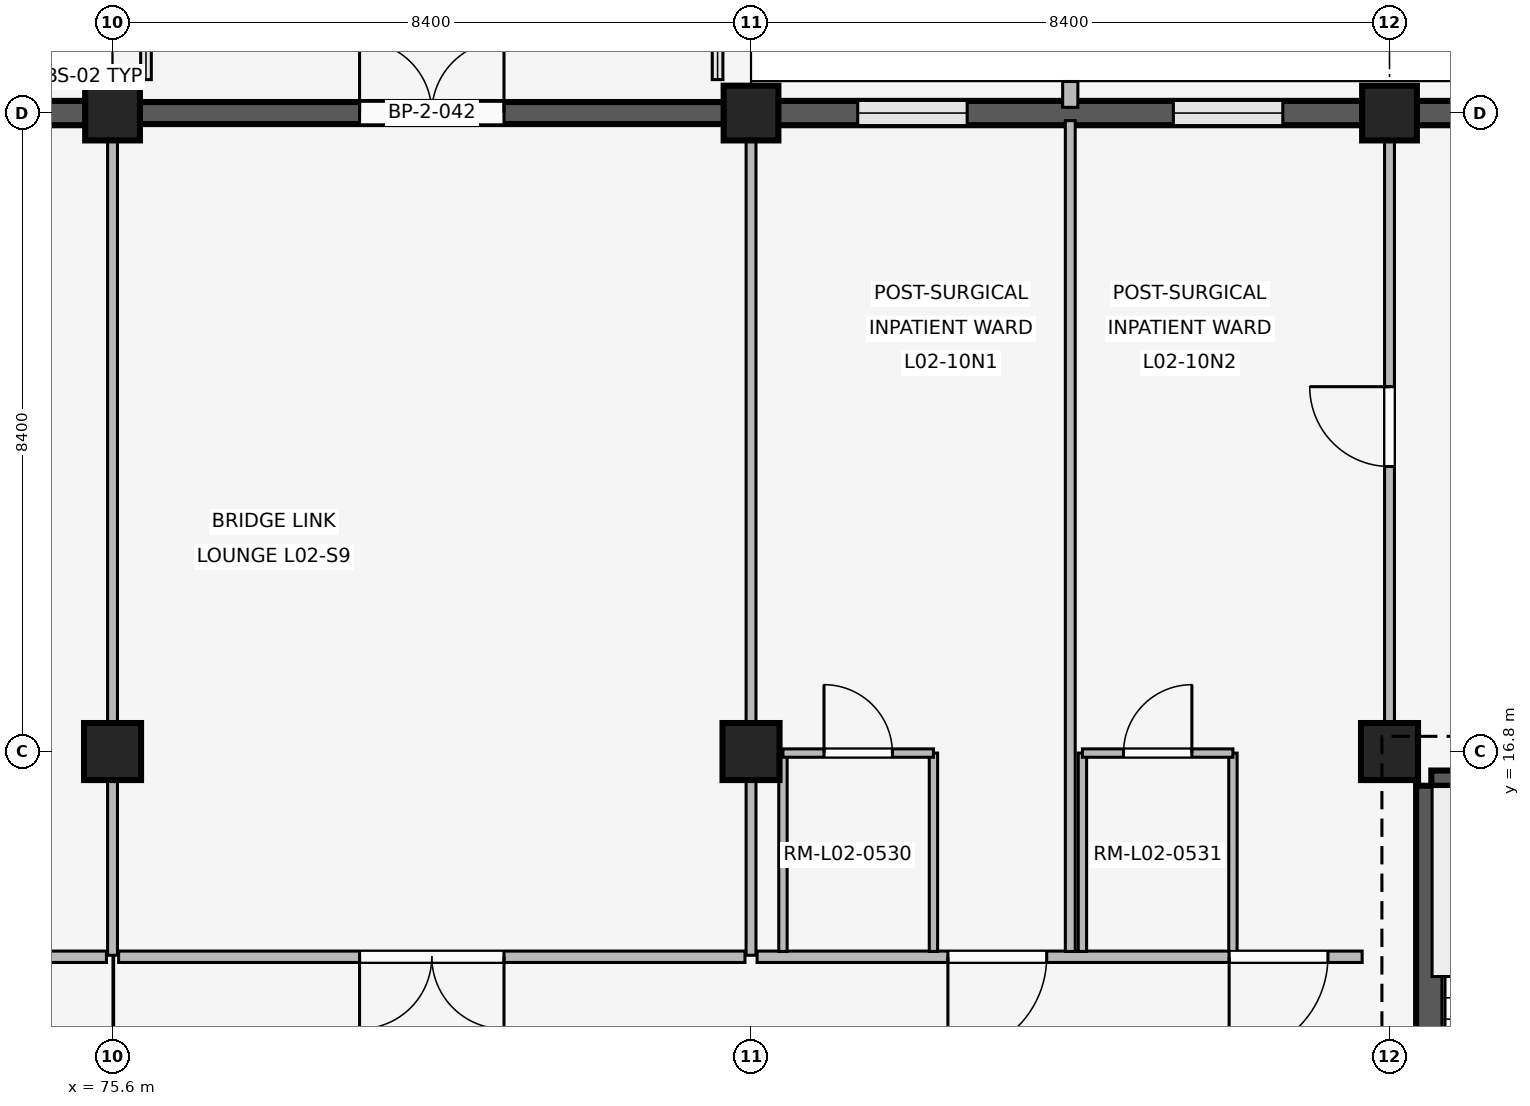
"""IFC4 building model, lengths in metres.
Left out: names, types, materials, properties, quantities, classifications, styles, units other than length and angle.
Written with IfcOpenShell. Run it as: python <this file> out.ifc"""

import sys

from ifc_helpers import new_model, si_unit, direction, frame, frame_2d, origin, origin_2d, place, context, subcontext, project, spatial, rectangle, extrude, element, fill, save


model = new_model("IFC4")
c1 = context("Model", 3, precision=1e-05, world=origin(), true_north=direction((0.0, 1.0)))
c2 = subcontext(c1, "Body", "Model", "MODEL_VIEW")
j1 = project(units=[si_unit("LENGTHUNIT", "METRE"), si_unit("PLANEANGLEUNIT", "RADIAN")], contexts=[c1])
p1 = place(None, origin())
s1 = spatial("IfcSite", under=j1, at=p1, CompositionType="ELEMENT")
p2 = place(p1, origin())
s2 = spatial("IfcBuilding", under=s1, at=p2, CompositionType="ELEMENT")
p3 = place(p2, frame((0.0, 0.0, 8.1)))
s3 = spatial("IfcBuildingStorey", under=s2, at=p3, CompositionType="ELEMENT", Elevation=8.1)
p4 = place(p3, frame((75.6, 16.8, 0.0), z_axis=(0.0, 0.0, 1.0), x_axis=(1.0, 0.0, 0.0)))
e1 = element("IfcColumn", 1, at=p4, inside=s3, PredefinedType="COLUMN", context=c2, shape_type="SweptSolid", body=[
    extrude(rectangle(XDim=0.75, YDim=0.75, at=origin_2d()), origin(), (0.0, 0.0, 1.0), 4.8),
])
p5 = place(p3, frame((75.6, 25.2, 0.0), z_axis=(0.0, 0.0, 1.0), x_axis=(1.0, 0.0, 0.0)))
e2 = element("IfcColumn", 2, at=p5, inside=s3, PredefinedType="COLUMN", context=c2, shape_type="SweptSolid", body=[
    extrude(rectangle(XDim=0.72, YDim=0.72, at=origin_2d()), origin(), (0.0, 0.0, 1.0), 4.8),
])
p6 = place(p3, frame((84.0, 16.8, 0.0), z_axis=(0.0, 0.0, 1.0), x_axis=(1.0, 0.0, 0.0)))
e3 = element("IfcColumn", 3, at=p6, inside=s3, PredefinedType="COLUMN", context=c2, shape_type="SweptSolid", body=[
    extrude(rectangle(XDim=0.75, YDim=0.75, at=origin_2d()), origin(), (0.0, 0.0, 1.0), 4.8),
])
p7 = place(p3, frame((84.0, 25.2, 0.0), z_axis=(0.0, 0.0, 1.0), x_axis=(1.0, 0.0, 0.0)))
e4 = element("IfcColumn", 4, at=p7, inside=s3, PredefinedType="COLUMN", context=c2, shape_type="SweptSolid", body=[
    extrude(rectangle(XDim=0.72, YDim=0.72, at=origin_2d()), origin(), (0.0, 0.0, 1.0), 4.8),
])
p8 = place(p3, frame((92.4, 16.8, 0.0), z_axis=(0.0, 0.0, 1.0), x_axis=(1.0, 0.0, 0.0)))
e5 = element("IfcColumn", 5, at=p8, inside=s3, PredefinedType="COLUMN", context=c2, shape_type="SweptSolid", body=[
    extrude(rectangle(XDim=0.75, YDim=0.75, at=origin_2d()), origin(), (0.0, 0.0, 1.0), 4.8),
])
p9 = place(p3, frame((92.4, 25.2, 0.0), z_axis=(0.0, 0.0, 1.0), x_axis=(1.0, 0.0, 0.0)))
e6 = element("IfcColumn", 6, at=p9, inside=s3, PredefinedType="COLUMN", context=c2, shape_type="SweptSolid", body=[
    extrude(rectangle(XDim=0.72, YDim=0.72, at=origin_2d()), origin(), (0.0, 0.0, 1.0), 4.8),
])
p10 = place(p3, frame((67.555, 25.2, 0.0), z_axis=(0.0, 0.0, 1.0), x_axis=(1.0, 0.0, 0.0)))
e7 = element("IfcWall", 7, at=p10, inside=s3, PredefinedType="SOLIDWALL", context=c2, shape_type="SweptSolid", body=[
    extrude(rectangle(XDim=7.69, YDim=0.32, at=frame_2d((3.845, 0.0))), origin(), (0.0, 0.0, 1.0), 3.86),
])
p11 = place(p10, frame((0.989, 0.0, 0.85)))
e8 = element("IfcOpeningElement", 8, at=p11, cuts=e7, PredefinedType="OPENING", context=c2, shape_type="SweptSolid", body=[
    extrude(rectangle(XDim=1.56, YDim=1.7, at=frame_2d((0.78, 0.85))), frame((0.0, 0.17, 0.0), z_axis=(0.0, -1.0, 0.0), x_axis=(1.0, 0.0, 0.0)), (0.0, 0.0, 1.0), 0.34),
])
p12 = place(p10, frame((5.141, 0.0, 0.85)))
e9 = element("IfcOpeningElement", 9, at=p12, cuts=e7, PredefinedType="OPENING", context=c2, shape_type="SweptSolid", body=[
    extrude(rectangle(XDim=1.56, YDim=1.7, at=frame_2d((0.78, 0.85))), frame((0.0, 0.17, 0.0), z_axis=(0.0, -1.0, 0.0), x_axis=(1.0, 0.0, 0.0)), (0.0, 0.0, 1.0), 0.34),
])
p13 = place(p3, frame((75.955, 25.2, 0.0), z_axis=(0.0, 0.0, 1.0), x_axis=(1.0, 0.0, 0.0)))
e10 = element("IfcWall", 10, at=p13, inside=s3, PredefinedType="SOLIDWALL", context=c2, shape_type="SweptSolid", body=[
    extrude(rectangle(XDim=7.69, YDim=0.29, at=frame_2d((3.845, 0.0))), origin(), (0.0, 0.0, 1.0), 3.86),
])
p14 = place(p13, frame((2.895, 0.0, 0.0)))
e11 = element("IfcOpeningElement", 11, at=p14, cuts=e10, PredefinedType="OPENING", context=c2, shape_type="SweptSolid", body=[
    extrude(rectangle(XDim=1.9, YDim=2.4, at=frame_2d((0.95, 1.2))), frame((0.0, 0.155, 0.0), z_axis=(0.0, -1.0, 0.0), x_axis=(1.0, 0.0, 0.0)), (0.0, 0.0, 1.0), 0.31),
])
p15 = place(p3, frame((84.355, 25.2, 0.0), z_axis=(0.0, 0.0, 1.0), x_axis=(1.0, 0.0, 0.0)))
e12 = element("IfcWall", 12, at=p15, inside=s3, PredefinedType="SOLIDWALL", context=c2, shape_type="SweptSolid", body=[
    extrude(rectangle(XDim=7.69, YDim=0.32, at=frame_2d((3.845, 0.0))), origin(), (0.0, 0.0, 1.0), 3.86),
])
p16 = place(p15, frame((1.049, 0.0, 0.85)))
e13 = element("IfcOpeningElement", 13, at=p16, cuts=e12, PredefinedType="OPENING", context=c2, shape_type="SweptSolid", body=[
    extrude(rectangle(XDim=1.44, YDim=1.62, at=frame_2d((0.72, 0.81))), frame((0.0, 0.17, 0.0), z_axis=(0.0, -1.0, 0.0), x_axis=(1.0, 0.0, 0.0)), (0.0, 0.0, 1.0), 0.34),
])
p17 = place(p15, frame((5.201, 0.0, 0.85)))
e14 = element("IfcOpeningElement", 14, at=p17, cuts=e12, PredefinedType="OPENING", context=c2, shape_type="SweptSolid", body=[
    extrude(rectangle(XDim=1.44, YDim=1.62, at=frame_2d((0.72, 0.81))), frame((0.0, 0.17, 0.0), z_axis=(0.0, -1.0, 0.0), x_axis=(1.0, 0.0, 0.0)), (0.0, 0.0, 1.0), 0.34),
])
p18 = place(p3, frame((88.2, 25.275, 0.0), z_axis=(0.0, 0.0, 1.0), x_axis=(0.0, 1.0, 0.0)))
e15 = element("IfcWall", 15, at=p18, inside=s3, PredefinedType="ELEMENTEDWALL", context=c2, shape_type="SweptSolid", body=[
    extrude(rectangle(XDim=0.34, YDim=0.2, at=frame_2d((0.17, 0.0))), origin(), (0.0, 0.0, 1.0), 3.84),
])
p19 = place(p3, frame((92.755, 25.2, 0.0), z_axis=(0.0, 0.0, 1.0), x_axis=(1.0, 0.0, 0.0)))
e16 = element("IfcWall", 16, at=p19, inside=s3, PredefinedType="SOLIDWALL", context=c2, shape_type="SweptSolid", body=[
    extrude(rectangle(XDim=7.69, YDim=0.32, at=frame_2d((3.845, 0.0))), origin(), (0.0, 0.0, 1.0), 3.86),
])
p20 = place(p19, frame((1.109, 0.0, 0.85)))
e17 = element("IfcOpeningElement", 17, at=p20, cuts=e16, PredefinedType="OPENING", context=c2, shape_type="SweptSolid", body=[
    extrude(rectangle(XDim=1.32, YDim=1.58, at=frame_2d((0.66, 0.79))), frame((0.0, 0.17, 0.0), z_axis=(0.0, -1.0, 0.0), x_axis=(1.0, 0.0, 0.0)), (0.0, 0.0, 1.0), 0.34),
])
p21 = place(p19, frame((5.261, 0.0, 0.85)))
e18 = element("IfcOpeningElement", 18, at=p21, cuts=e16, PredefinedType="OPENING", context=c2, shape_type="SweptSolid", body=[
    extrude(rectangle(XDim=1.32, YDim=1.58, at=frame_2d((0.66, 0.79))), frame((0.0, 0.17, 0.0), z_axis=(0.0, -1.0, 0.0), x_axis=(1.0, 0.0, 0.0)), (0.0, 0.0, 1.0), 0.34),
])
p22 = place(p3, frame((92.95, 16.35, 0.0), z_axis=(0.0, 0.0, 1.0), x_axis=(1.0, 0.0, 0.0)))
e19 = element("IfcWall", 19, at=p22, inside=s3, PredefinedType="SHEAR", context=c2, shape_type="SweptSolid", body=[
    extrude(rectangle(XDim=7.5, YDim=0.4, at=frame_2d((3.75, 0.0))), origin(), (0.0, 0.0, 1.0), 4.52),
])
p23 = place(p3, frame((92.95, 8.8, 0.0), z_axis=(0.0, 0.0, 1.0), x_axis=(0.0, 1.0, 0.0)))
e20 = element("IfcWall", 20, at=p23, inside=s3, PredefinedType="SHEAR", context=c2, shape_type="SweptSolid", body=[
    extrude(rectangle(XDim=7.55, YDim=0.4, at=frame_2d((3.775, 0.0))), origin(), (0.0, 0.0, 1.0), 4.52),
])
p24 = place(p23, frame((0.28, 0.0, 0.0)))
e21 = element("IfcOpeningElement", 21, at=p24, cuts=e20, PredefinedType="OPENING", context=c2, shape_type="SweptSolid", body=[
    extrude(rectangle(XDim=1.0, YDim=2.15, at=frame_2d((0.5, 1.075))), frame((0.0, 0.21, 0.0), z_axis=(0.0, -1.0, 0.0), x_axis=(1.0, 0.0, 0.0)), (0.0, 0.0, 1.0), 0.42),
])
p25 = place(p3, frame((75.52, 14.1, 0.0), z_axis=(0.0, 0.0, 1.0), x_axis=(-1.0, 0.0, 0.0)))
e22 = element("IfcWall", 22, at=p25, inside=s3, PredefinedType="PARTITIONING", context=c2, shape_type="SweptSolid", body=[
    extrude(rectangle(XDim=8.24, YDim=0.15, at=frame_2d((4.12, 0.0))), origin(), (0.0, 0.0, 1.0), 3.84),
])
p26 = place(p25, frame((3.37, 0.0, 0.0)))
e23 = element("IfcOpeningElement", 23, at=p26, cuts=e22, PredefinedType="OPENING", context=c2, shape_type="SweptSolid", body=[
    extrude(rectangle(XDim=1.5, YDim=2.3, at=frame_2d((0.75, 1.15))), frame((0.0, 0.085, 0.0), z_axis=(0.0, -1.0, 0.0), x_axis=(1.0, 0.0, 0.0)), (0.0, 0.0, 1.0), 0.17),
])
p27 = place(p3, frame((75.6, 14.12, 0.0), z_axis=(0.0, 0.0, 1.0), x_axis=(0.0, 1.0, 0.0)))
e24 = element("IfcWall", 24, at=p27, inside=s3, PredefinedType="PARTITIONING", context=c2, shape_type="SweptSolid", body=[
    extrude(rectangle(XDim=10.94, YDim=0.13, at=frame_2d((5.47, 0.0))), origin(), (0.0, 0.0, 1.0), 3.84),
])
p28 = place(p3, frame((83.92, 14.1, 0.0), z_axis=(0.0, 0.0, 1.0), x_axis=(-1.0, 0.0, 0.0)))
e25 = element("IfcWall", 25, at=p28, inside=s3, PredefinedType="PARTITIONING", context=c2, shape_type="SweptSolid", body=[
    extrude(rectangle(XDim=8.24, YDim=0.15, at=frame_2d((4.12, 0.0))), origin(), (0.0, 0.0, 1.0), 3.84),
])
p29 = place(p28, frame((3.17, 0.0, 0.0)))
e26 = element("IfcOpeningElement", 26, at=p29, cuts=e25, PredefinedType="OPENING", context=c2, shape_type="SweptSolid", body=[
    extrude(rectangle(XDim=1.9, YDim=2.4, at=frame_2d((0.95, 1.2))), frame((0.0, 0.085, 0.0), z_axis=(0.0, -1.0, 0.0), x_axis=(1.0, 0.0, 0.0)), (0.0, 0.0, 1.0), 0.17),
])
p30 = place(p3, frame((84.0, 14.12, 0.0), z_axis=(0.0, 0.0, 1.0), x_axis=(0.0, 1.0, 0.0)))
e27 = element("IfcWall", 27, at=p30, inside=s3, PredefinedType="PARTITIONING", context=c2, shape_type="SweptSolid", body=[
    extrude(rectangle(XDim=10.94, YDim=0.13, at=frame_2d((5.47, 0.0))), origin(), (0.0, 0.0, 1.0), 3.84),
])
p31 = place(p3, frame((92.04, 14.1, 0.0), z_axis=(0.0, 0.0, 1.0), x_axis=(-1.0, 0.0, 0.0)))
e28 = element("IfcWall", 28, at=p31, inside=s3, PredefinedType="PARTITIONING", context=c2, shape_type="SweptSolid", body=[
    extrude(rectangle(XDim=7.96, YDim=0.15, at=frame_2d((3.98, 0.0))), origin(), (0.0, 0.0, 1.0), 3.84),
])
p32 = place(p31, frame((0.45, 0.0, 0.0)))
e29 = element("IfcOpeningElement", 29, at=p32, cuts=e28, PredefinedType="OPENING", context=c2, shape_type="SweptSolid", body=[
    extrude(rectangle(XDim=1.3, YDim=2.25, at=frame_2d((0.65, 1.125))), frame((0.0, 0.085, 0.0), z_axis=(0.0, -1.0, 0.0), x_axis=(1.0, 0.0, 0.0)), (0.0, 0.0, 1.0), 0.17),
])
p33 = place(p31, frame((4.15, 0.0, 0.0)))
e30 = element("IfcOpeningElement", 30, at=p33, cuts=e28, PredefinedType="OPENING", context=c2, shape_type="SweptSolid", body=[
    extrude(rectangle(XDim=1.3, YDim=2.25, at=frame_2d((0.65, 1.125))), frame((0.0, 0.085, 0.0), z_axis=(0.0, -1.0, 0.0), x_axis=(1.0, 0.0, 0.0)), (0.0, 0.0, 1.0), 0.17),
])
p34 = place(p3, frame((88.2, 14.17, 0.0), z_axis=(0.0, 0.0, 1.0), x_axis=(0.0, 1.0, 0.0)))
e31 = element("IfcWall", 31, at=p34, inside=s3, PredefinedType="PARTITIONING", context=c2, shape_type="SweptSolid", body=[
    extrude(rectangle(XDim=10.93, YDim=0.13, at=frame_2d((5.465, 0.0))), origin(), (0.0, 0.0, 1.0), 3.84),
])
for number, where, z_axis, x_axis in (
    (32, (84.42, 14.17, 0.0), (0.0, 0.0, 1.0), (0.0, 1.0, 0.0)),
    (33, (86.4, 14.17, 0.0), (0.0, 0.0, 1.0), (0.0, 1.0, 0.0)),
):
    element("IfcWall", number, at=place(p3, frame(where, z_axis=z_axis, x_axis=x_axis)), inside=s3, PredefinedType="PARTITIONING", context=c2, shape_type="SweptSolid", body=[
        extrude(rectangle(XDim=2.61, YDim=0.11, at=frame_2d((1.305, 0.0))), origin(), (0.0, 0.0, 1.0), 3.84),
    ])
p35 = place(p3, frame((84.42, 16.78, 0.0), z_axis=(0.0, 0.0, 1.0), x_axis=(1.0, 0.0, 0.0)))
e34 = element("IfcWall", 34, at=p35, inside=s3, PredefinedType="PARTITIONING", context=c2, shape_type="SweptSolid", body=[
    extrude(rectangle(XDim=1.98, YDim=0.11, at=frame_2d((0.99, 0.0))), origin(), (0.0, 0.0, 1.0), 3.84),
])
p36 = place(p35, frame((0.54, 0.0, 0.0)))
e35 = element("IfcOpeningElement", 35, at=p36, cuts=e34, PredefinedType="OPENING", context=c2, shape_type="SweptSolid", body=[
    extrude(rectangle(XDim=0.9, YDim=2.1, at=frame_2d((0.45, 1.05))), frame((0.0, 0.065, 0.0), z_axis=(0.0, -1.0, 0.0), x_axis=(1.0, 0.0, 0.0)), (0.0, 0.0, 1.0), 0.13),
])
for number, where, z_axis, x_axis in (
    (36, (88.36, 14.17, 0.0), (0.0, 0.0, 1.0), (0.0, 1.0, 0.0)),
    (37, (90.34, 14.17, 0.0), (0.0, 0.0, 1.0), (0.0, 1.0, 0.0)),
):
    element("IfcWall", number, at=place(p3, frame(where, z_axis=z_axis, x_axis=x_axis)), inside=s3, PredefinedType="PARTITIONING", context=c2, shape_type="SweptSolid", body=[
        extrude(rectangle(XDim=2.61, YDim=0.11, at=frame_2d((1.305, 0.0))), origin(), (0.0, 0.0, 1.0), 3.84),
    ])
p37 = place(p3, frame((88.36, 16.78, 0.0), z_axis=(0.0, 0.0, 1.0), x_axis=(1.0, 0.0, 0.0)))
e38 = element("IfcWall", 38, at=p37, inside=s3, PredefinedType="PARTITIONING", context=c2, shape_type="SweptSolid", body=[
    extrude(rectangle(XDim=1.98, YDim=0.11, at=frame_2d((0.99, 0.0))), origin(), (0.0, 0.0, 1.0), 3.84),
])
p38 = place(p37, frame((0.54, 0.0, 0.0)))
e39 = element("IfcOpeningElement", 39, at=p38, cuts=e38, PredefinedType="OPENING", context=c2, shape_type="SweptSolid", body=[
    extrude(rectangle(XDim=0.9, YDim=2.1, at=frame_2d((0.45, 1.05))), frame((0.0, 0.065, 0.0), z_axis=(0.0, -1.0, 0.0), x_axis=(1.0, 0.0, 0.0)), (0.0, 0.0, 1.0), 0.13),
])
p39 = place(p3, frame((92.4, 17.15, 0.0), z_axis=(0.0, 0.0, 1.0), x_axis=(0.0, 1.0, 0.0)))
e40 = element("IfcWall", 40, at=p39, inside=s3, PredefinedType="PARTITIONING", context=c2, shape_type="SweptSolid", body=[
    extrude(rectangle(XDim=7.91, YDim=0.13, at=frame_2d((3.955, 0.0))), origin(), (0.0, 0.0, 1.0), 3.84),
])
p40 = place(p39, frame((3.4, 0.0, 0.0)))
e41 = element("IfcOpeningElement", 41, at=p40, cuts=e40, PredefinedType="OPENING", context=c2, shape_type="SweptSolid", body=[
    extrude(rectangle(XDim=1.05, YDim=2.2, at=frame_2d((0.525, 1.1))), frame((0.0, 0.075, 0.0), z_axis=(0.0, -1.0, 0.0), x_axis=(1.0, 0.0, 0.0)), (0.0, 0.0, 1.0), 0.15),
])
p41 = place(p14, origin())
e42 = element("IfcDoor", 42, at=p41, inside=s3, OperationType="DOUBLE_SWING_LEFT", PredefinedType="DOOR", context=c2, shape_type="SweptSolid", body=[
    extrude(rectangle(XDim=1.9, YDim=2.4, at=frame_2d((0.95, 1.2))), frame((0.0, 0.025, 0.0), z_axis=(0.0, -1.0, 0.0), x_axis=(1.0, 0.0, 0.0)), (0.0, 0.0, 1.0), 0.05),
])
fill(e11, e42)
p42 = place(p16, origin())
e43 = element("IfcWindow", 43, at=p42, inside=s3, PartitioningType="SINGLE_PANEL", PredefinedType="WINDOW", context=c2, shape_type="SweptSolid", body=[
    extrude(rectangle(XDim=1.44, YDim=1.62, at=frame_2d((0.72, 0.81))), frame((0.0, 0.03, 0.0), z_axis=(0.0, -1.0, 0.0), x_axis=(1.0, 0.0, 0.0)), (0.0, 0.0, 1.0), 0.06),
])
fill(e13, e43)
p43 = place(p17, origin())
e44 = element("IfcWindow", 44, at=p43, inside=s3, PartitioningType="SINGLE_PANEL", PredefinedType="WINDOW", context=c2, shape_type="SweptSolid", body=[
    extrude(rectangle(XDim=1.44, YDim=1.62, at=frame_2d((0.72, 0.81))), frame((0.0, 0.03, 0.0), z_axis=(0.0, -1.0, 0.0), x_axis=(1.0, 0.0, 0.0)), (0.0, 0.0, 1.0), 0.06),
])
fill(e14, e44)
p44 = place(p29, origin())
e45 = element("IfcDoor", 45, at=p44, inside=s3, OperationType="DOUBLE_SWING_LEFT", PredefinedType="DOOR", context=c2, shape_type="SweptSolid", body=[
    extrude(rectangle(XDim=1.9, YDim=2.4, at=frame_2d((0.95, 1.2))), frame((0.0, 0.025, 0.0), z_axis=(0.0, -1.0, 0.0), x_axis=(1.0, 0.0, 0.0)), (0.0, 0.0, 1.0), 0.05),
])
fill(e26, e45)
p45 = place(p32, origin())
e46 = element("IfcDoor", 46, at=p45, inside=s3, OperationType="SINGLE_SWING_RIGHT", PredefinedType="DOOR", context=c2, shape_type="SweptSolid", body=[
    extrude(rectangle(XDim=1.3, YDim=2.25, at=frame_2d((0.65, 1.125))), frame((0.0, 0.025, 0.0), z_axis=(0.0, -1.0, 0.0), x_axis=(1.0, 0.0, 0.0)), (0.0, 0.0, 1.0), 0.05),
])
fill(e29, e46)
p46 = place(p33, origin())
e47 = element("IfcDoor", 47, at=p46, inside=s3, OperationType="SINGLE_SWING_RIGHT", PredefinedType="DOOR", context=c2, shape_type="SweptSolid", body=[
    extrude(rectangle(XDim=1.3, YDim=2.25, at=frame_2d((0.65, 1.125))), frame((0.0, 0.025, 0.0), z_axis=(0.0, -1.0, 0.0), x_axis=(1.0, 0.0, 0.0)), (0.0, 0.0, 1.0), 0.05),
])
fill(e30, e47)
p47 = place(p36, origin())
e48 = element("IfcDoor", 48, at=p47, inside=s3, OperationType="SINGLE_SWING_LEFT", PredefinedType="DOOR", context=c2, shape_type="SweptSolid", body=[
    extrude(rectangle(XDim=0.9, YDim=2.1, at=frame_2d((0.45, 1.05))), frame((0.0, 0.025, 0.0), z_axis=(0.0, -1.0, 0.0), x_axis=(1.0, 0.0, 0.0)), (0.0, 0.0, 1.0), 0.05),
])
fill(e35, e48)
p48 = place(p38, origin())
e49 = element("IfcDoor", 49, at=p48, inside=s3, OperationType="SINGLE_SWING_RIGHT", PredefinedType="DOOR", context=c2, shape_type="SweptSolid", body=[
    extrude(rectangle(XDim=0.9, YDim=2.1, at=frame_2d((0.45, 1.05))), frame((0.0, 0.025, 0.0), z_axis=(0.0, -1.0, 0.0), x_axis=(1.0, 0.0, 0.0)), (0.0, 0.0, 1.0), 0.05),
])
fill(e39, e49)
p49 = place(p40, origin())
e50 = element("IfcDoor", 50, at=p49, inside=s3, OperationType="SINGLE_SWING_RIGHT", PredefinedType="DOOR", context=c2, shape_type="SweptSolid", body=[
    extrude(rectangle(XDim=1.05, YDim=2.2, at=frame_2d((0.525, 1.1))), frame((0.0, 0.025, 0.0), z_axis=(0.0, -1.0, 0.0), x_axis=(1.0, 0.0, 0.0)), (0.0, 0.0, 1.0), 0.05),
])
fill(e41, e50)
save(model, sys.argv[1])
